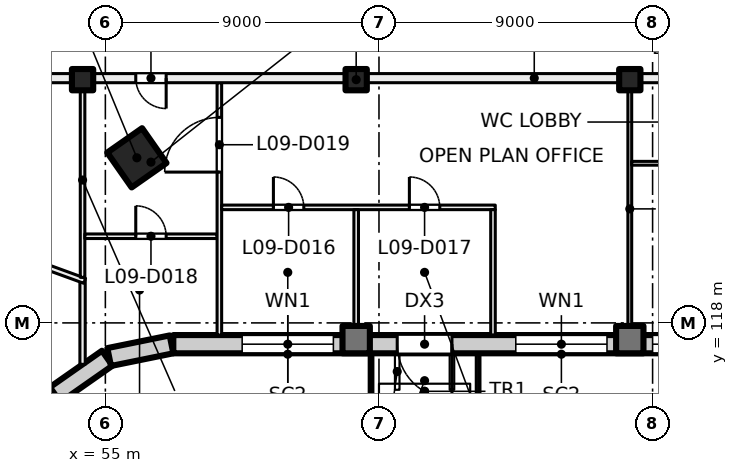
"""IFC4 building model, lengths in metres.
Left out: names, types, materials, properties, quantities, classifications, styles, units other than length and angle.
Written with IfcOpenShell. Run it as: python <this file> out.ifc"""

import sys

from ifc_helpers import new_model, si_unit, direction, frame, frame_2d, origin, origin_2d, place, context, subcontext, project, spatial, rectangle, hollow_rectangle, extrude, element, fill, save


model = new_model("IFC4")
c1 = context("Model", 3, precision=1e-05, world=origin(), true_north=direction((0.0, 1.0)))
c2 = subcontext(c1, "Body", "Model", "MODEL_VIEW")
j1 = project(units=[si_unit("LENGTHUNIT", "METRE"), si_unit("PLANEANGLEUNIT", "RADIAN")], contexts=[c1])
p1 = place(None, origin())
s1 = spatial("IfcSite", under=j1, at=p1, CompositionType="ELEMENT")
p2 = place(p1, origin())
s2 = spatial("IfcBuilding", under=s1, at=p2, CompositionType="ELEMENT")
p3 = place(p2, frame((0.0, 0.0, 43.5)))
s3 = spatial("IfcBuildingStorey", under=s2, at=p3, CompositionType="ELEMENT", Elevation=43.5)
p4 = place(p3, frame((56.036, 123.43, 0.0), z_axis=(0.0, 0.0, 1.0), x_axis=(0.573576436351, -0.819152044289, 0.0)))
e1 = element("IfcColumn", 1, at=p4, inside=s3, PredefinedType="COLUMN", context=c2, shape_type="SweptSolid", body=[
    extrude(hollow_rectangle(XDim=1.4, YDim=1.4, WallThickness=0.04, at=origin_2d()), origin(), (0.0, 0.0, 1.0), 4.0),
])
for number, where, z_axis, x_axis in (
    (2, (54.25, 126.0, 0.0), (0.0, 0.0, 1.0), (1.0, 0.0, 0.0)),
    (3, (63.25, 126.0, 0.0), (0.0, 0.0, 1.0), (1.0, 0.0, 0.0)),
    (4, (72.25, 126.0, 0.0), (0.0, 0.0, 1.0), (1.0, 0.0, 0.0)),
):
    element("IfcColumn", number, at=place(p3, frame(where, z_axis=z_axis, x_axis=x_axis)), inside=s3, PredefinedType="COLUMN", context=c2, shape_type="SweptSolid", body=[
        extrude(rectangle(XDim=0.7, YDim=0.7, at=origin_2d()), origin(), (0.0, 0.0, 1.0), 4.0),
    ])
for number, where, z_axis, x_axis in (
    (5, (63.25, 117.45, 0.0), (0.0, 0.0, 1.0), (1.0, 0.0, 0.0)),
    (6, (72.25, 117.45, 0.0), (0.0, 0.0, 1.0), (1.0, 0.0, 0.0)),
):
    element("IfcColumn", number, at=place(p3, frame(where, z_axis=z_axis, x_axis=x_axis)), inside=s3, PredefinedType="COLUMN", context=c2, shape_type="SweptSolid", body=[
        extrude(rectangle(XDim=0.9, YDim=0.9, at=origin_2d()), origin(), (0.0, 0.0, 1.0), 4.0),
    ])
p5 = place(p3, frame((53.305, 115.578, 0.0), z_axis=(0.0, 0.0, 1.0), x_axis=(-0.522402266438, -0.852699168535, 0.0)))
e7 = element("IfcWall", 7, at=p5, inside=s3, PredefinedType="SOLIDWALL", context=c2, shape_type="SweptSolid", body=[
    extrude(rectangle(XDim=2.042, YDim=0.6, at=frame_2d((1.021, 0.0))), origin(), (0.0, 0.0, 1.0), 3.625),
])
for number, where, z_axis, x_axis in (
    (8, (55.062, 116.839, 0.0), (0.0, 0.0, 1.0), (-0.819, -0.574, 0.0)),
    (9, (57.175, 117.294, 0.0), (0.0, 0.0, 1.0), (-0.98, -0.199, 0.0)),
):
    element("IfcWall", number, at=place(p3, frame(where, z_axis=z_axis, x_axis=x_axis)), inside=s3, PredefinedType="SOLIDWALL", context=c2, shape_type="SweptSolid", body=[
        extrude(rectangle(XDim=2.092, YDim=0.6, at=frame_2d((1.046, 0.0))), origin(), (0.0, 0.0, 1.0), 3.625),
    ])
p6 = place(p3, frame((90.98, 117.3, 0.0), z_axis=(0.0, 0.0, 1.0), x_axis=(-1.0, 0.0, 0.0)))
e10 = element("IfcWall", 10, at=p6, inside=s3, PredefinedType="SOLIDWALL", context=c2, shape_type="SweptSolid", body=[
    extrude(rectangle(XDim=33.745, YDim=0.6, at=frame_2d((16.873, 0.0))), origin(), (0.0, 0.0, 1.0), 3.625),
])
p7 = place(p6, frame((1.48, 0.0, 0.9)))
e11 = element("IfcOpeningElement", 11, at=p7, cuts=e10, PredefinedType="OPENING", context=c2, shape_type="SweptSolid", body=[
    extrude(rectangle(XDim=3.0, YDim=2.4, at=frame_2d((1.5, 1.2))), frame((0.0, 0.31, 0.0), z_axis=(0.0, -1.0, 0.0), x_axis=(1.0, 0.0, 0.0)), (0.0, 0.0, 1.0), 0.62),
])
p8 = place(p6, frame((5.98, 0.0, 0.9)))
e12 = element("IfcOpeningElement", 12, at=p8, cuts=e10, PredefinedType="OPENING", context=c2, shape_type="SweptSolid", body=[
    extrude(rectangle(XDim=3.0, YDim=2.4, at=frame_2d((1.5, 1.2))), frame((0.0, 0.31, 0.0), z_axis=(0.0, -1.0, 0.0), x_axis=(1.0, 0.0, 0.0)), (0.0, 0.0, 1.0), 0.62),
])
p9 = place(p6, frame((10.48, 0.0, 0.9)))
e13 = element("IfcOpeningElement", 13, at=p9, cuts=e10, PredefinedType="OPENING", context=c2, shape_type="SweptSolid", body=[
    extrude(rectangle(XDim=3.0, YDim=2.4, at=frame_2d((1.5, 1.2))), frame((0.0, 0.31, 0.0), z_axis=(0.0, -1.0, 0.0), x_axis=(1.0, 0.0, 0.0)), (0.0, 0.0, 1.0), 0.62),
])
p10 = place(p6, frame((14.98, 0.0, 0.9)))
e14 = element("IfcOpeningElement", 14, at=p10, cuts=e10, PredefinedType="OPENING", context=c2, shape_type="SweptSolid", body=[
    extrude(rectangle(XDim=3.0, YDim=2.4, at=frame_2d((1.5, 1.2))), frame((0.0, 0.31, 0.0), z_axis=(0.0, -1.0, 0.0), x_axis=(1.0, 0.0, 0.0)), (0.0, 0.0, 1.0), 0.62),
])
p11 = place(p6, frame((19.48, 0.0, 0.9)))
e15 = element("IfcOpeningElement", 15, at=p11, cuts=e10, PredefinedType="OPENING", context=c2, shape_type="SweptSolid", body=[
    extrude(rectangle(XDim=3.0, YDim=2.4, at=frame_2d((1.5, 1.2))), frame((0.0, 0.31, 0.0), z_axis=(0.0, -1.0, 0.0), x_axis=(1.0, 0.0, 0.0)), (0.0, 0.0, 1.0), 0.62),
])
p12 = place(p6, frame((24.58, 0.0, 0.0)))
e16 = element("IfcOpeningElement", 16, at=p12, cuts=e10, PredefinedType="OPENING", context=c2, shape_type="SweptSolid", body=[
    extrude(rectangle(XDim=1.8, YDim=2.4, at=frame_2d((0.9, 1.2))), frame((0.0, 0.31, 0.0), z_axis=(0.0, -1.0, 0.0), x_axis=(1.0, 0.0, 0.0)), (0.0, 0.0, 1.0), 0.62),
])
p13 = place(p6, frame((28.48, 0.0, 0.9)))
e17 = element("IfcOpeningElement", 17, at=p13, cuts=e10, PredefinedType="OPENING", context=c2, shape_type="SweptSolid", body=[
    extrude(rectangle(XDim=3.0, YDim=2.4, at=frame_2d((1.5, 1.2))), frame((0.0, 0.31, 0.0), z_axis=(0.0, -1.0, 0.0), x_axis=(1.0, 0.0, 0.0)), (0.0, 0.0, 1.0), 0.62),
])
p14 = place(p3, frame((54.25, 116.637, 0.0), z_axis=(0.0, 0.0, 1.0), x_axis=(0.0, 1.0, 0.0)))
e18 = element("IfcWall", 18, at=p14, inside=s3, PredefinedType="PARTITIONING", context=c2, shape_type="SweptSolid", body=[
    extrude(rectangle(XDim=2.776, YDim=0.175, at=frame_2d((1.388, 0.0))), origin(), (0.0, 0.0, 1.0), 3.625),
])
p15 = place(p3, frame((54.32, 119.384, 0.0), z_axis=(0.0, 0.0, 1.0), x_axis=(-0.939632908118, 0.342184157994, 0.0)))
e19 = element("IfcWall", 19, at=p15, inside=s3, PredefinedType="PARTITIONING", context=c2, shape_type="SweptSolid", body=[
    extrude(rectangle(XDim=8.665, YDim=0.175, at=frame_2d((4.333, 0.0))), origin(), (0.0, 0.0, 1.0), 3.625),
])
p16 = place(p3, frame((54.25, 119.498, 0.0), z_axis=(0.0, 0.0, 1.0), x_axis=(0.0, 1.0, 0.0)))
e20 = element("IfcWall", 20, at=p16, inside=s3, PredefinedType="PARTITIONING", context=c2, shape_type="SweptSolid", body=[
    extrude(rectangle(XDim=6.402, YDim=0.15, at=frame_2d((3.201, 0.0))), origin(), (0.0, 0.0, 1.0), 3.625),
])
p17 = place(p3, frame((54.325, 120.85, 0.0), z_axis=(0.0, 0.0, 1.0), x_axis=(1.0, 0.0, 0.0)))
e21 = element("IfcWall", 21, at=p17, inside=s3, PredefinedType="PARTITIONING", context=c2, shape_type="SweptSolid", body=[
    extrude(rectangle(XDim=4.35, YDim=0.15, at=frame_2d((2.175, 0.0))), origin(), (0.0, 0.0, 1.0), 3.625),
])
p18 = place(p17, frame((1.675, 0.0, 0.0)))
e22 = element("IfcOpeningElement", 22, at=p18, cuts=e21, PredefinedType="OPENING", context=c2, shape_type="SweptSolid", body=[
    extrude(rectangle(XDim=1.0, YDim=2.1, at=frame_2d((0.5, 1.05))), frame((0.0, 0.085, 0.0), z_axis=(0.0, -1.0, 0.0), x_axis=(1.0, 0.0, 0.0)), (0.0, 0.0, 1.0), 0.17),
])
p19 = place(p3, frame((58.75, 117.6, 0.0), z_axis=(0.0, 0.0, 1.0), x_axis=(0.0, 1.0, 0.0)))
e23 = element("IfcWall", 23, at=p19, inside=s3, PredefinedType="PARTITIONING", context=c2, shape_type="SweptSolid", body=[
    extrude(rectangle(XDim=8.3, YDim=0.15, at=frame_2d((4.15, 0.0))), origin(), (0.0, 0.0, 1.0), 3.625),
])
p20 = place(p19, frame((5.36, 0.0, 0.0)))
e24 = element("IfcOpeningElement", 24, at=p20, cuts=e23, PredefinedType="OPENING", context=c2, shape_type="SweptSolid", body=[
    extrude(rectangle(XDim=1.8, YDim=2.1, at=frame_2d((0.9, 1.05))), frame((0.0, 0.085, 0.0), z_axis=(0.0, -1.0, 0.0), x_axis=(1.0, 0.0, 0.0)), (0.0, 0.0, 1.0), 0.17),
])
p21 = place(p3, frame((58.825, 121.8, 0.0), z_axis=(0.0, 0.0, 1.0), x_axis=(1.0, 0.0, 0.0)))
e25 = element("IfcWall", 25, at=p21, inside=s3, PredefinedType="PARTITIONING", context=c2, shape_type="SweptSolid", body=[
    extrude(rectangle(XDim=9.0, YDim=0.15, at=frame_2d((4.5, 0.0))), origin(), (0.0, 0.0, 1.0), 3.625),
])
p22 = place(p21, frame((1.702, 0.0, 0.0)))
e26 = element("IfcOpeningElement", 26, at=p22, cuts=e25, PredefinedType="OPENING", context=c2, shape_type="SweptSolid", body=[
    extrude(rectangle(XDim=1.0, YDim=2.1, at=frame_2d((0.5, 1.05))), frame((0.0, 0.085, 0.0), z_axis=(0.0, -1.0, 0.0), x_axis=(1.0, 0.0, 0.0)), (0.0, 0.0, 1.0), 0.17),
])
p23 = place(p21, frame((6.175, 0.0, 0.0)))
e27 = element("IfcOpeningElement", 27, at=p23, cuts=e25, PredefinedType="OPENING", context=c2, shape_type="SweptSolid", body=[
    extrude(rectangle(XDim=1.0, YDim=2.1, at=frame_2d((0.5, 1.05))), frame((0.0, 0.085, 0.0), z_axis=(0.0, -1.0, 0.0), x_axis=(1.0, 0.0, 0.0)), (0.0, 0.0, 1.0), 0.17),
])
for number, where, z_axis, x_axis in (
    (28, (63.25, 121.725, 0.0), (0.0, 0.0, 1.0), (0.0, -1.0, 0.0)),
    (29, (67.75, 117.6, 0.0), (0.0, 0.0, 1.0), (0.0, 1.0, 0.0)),
):
    element("IfcWall", number, at=place(p3, frame(where, z_axis=z_axis, x_axis=x_axis)), inside=s3, PredefinedType="PARTITIONING", context=c2, shape_type="SweptSolid", body=[
        extrude(rectangle(XDim=4.125, YDim=0.15, at=frame_2d((2.062, 0.0))), origin(), (0.0, 0.0, 1.0), 3.625),
    ])
p24 = place(p3, frame((72.25, 117.6, 0.0), z_axis=(0.0, 0.0, 1.0), x_axis=(0.0, 1.0, 0.0)))
e30 = element("IfcWall", 30, at=p24, inside=s3, PredefinedType="PARTITIONING", context=c2, shape_type="SweptSolid", body=[
    extrude(rectangle(XDim=8.3, YDim=0.125, at=frame_2d((4.15, 0.0))), origin(), (0.0, 0.0, 1.0), 3.625),
])
p25 = place(p3, frame((81.188, 123.25, 0.0), z_axis=(0.0, 0.0, 1.0), x_axis=(-1.0, 0.0, 0.0)))
e31 = element("IfcWall", 31, at=p25, inside=s3, PredefinedType="PARTITIONING", context=c2, shape_type="SweptSolid", body=[
    extrude(rectangle(XDim=8.876, YDim=0.125, at=frame_2d((4.438, 0.0))), origin(), (0.0, 0.0, 1.0), 3.625),
])
p26 = place(p25, frame((6.267, 0.0, 0.0)))
e32 = element("IfcOpeningElement", 32, at=p26, cuts=e31, PredefinedType="OPENING", context=c2, shape_type="SweptSolid", body=[
    extrude(rectangle(XDim=0.8, YDim=2.1, at=frame_2d((0.4, 1.05))), frame((0.0, 0.073, 0.0), z_axis=(0.0, -1.0, 0.0), x_axis=(1.0, 0.0, 0.0)), (0.0, 0.0, 1.0), 0.145),
])
p27 = place(p25, frame((3.037, 0.0, 0.0)))
e33 = element("IfcOpeningElement", 33, at=p27, cuts=e31, PredefinedType="OPENING", context=c2, shape_type="SweptSolid", body=[
    extrude(rectangle(XDim=0.8, YDim=2.1, at=frame_2d((0.4, 1.05))), frame((0.0, 0.073, 0.0), z_axis=(0.0, -1.0, 0.0), x_axis=(1.0, 0.0, 0.0)), (0.0, 0.0, 1.0), 0.145),
])
p28 = place(p3, frame((91.0, 126.05, 0.0), z_axis=(0.0, 0.0, 1.0), x_axis=(-1.0, 0.0, 0.0)))
e34 = element("IfcWall", 34, at=p28, inside=s3, PredefinedType="PARTITIONING", context=c2, shape_type="SweptSolid", body=[
    extrude(rectangle(XDim=43.785, YDim=0.3, at=frame_2d((21.893, 0.0))), origin(), (0.0, 0.0, 1.0), 3.625),
])
p29 = place(p28, frame((4.375, 0.0, 0.0)))
e35 = element("IfcOpeningElement", 35, at=p29, cuts=e34, PredefinedType="OPENING", context=c2, shape_type="SweptSolid", body=[
    extrude(rectangle(XDim=1.0, YDim=2.1, at=frame_2d((0.5, 1.05))), frame((0.0, 0.16, 0.0), z_axis=(0.0, -1.0, 0.0), x_axis=(1.0, 0.0, 0.0)), (0.0, 0.0, 1.0), 0.32),
])
p30 = place(p28, frame((15.0, 0.0, 0.0)))
e36 = element("IfcOpeningElement", 36, at=p30, cuts=e34, PredefinedType="OPENING", context=c2, shape_type="SweptSolid", body=[
    extrude(rectangle(XDim=1.0, YDim=2.1, at=frame_2d((0.5, 1.05))), frame((0.0, 0.16, 0.0), z_axis=(0.0, -1.0, 0.0), x_axis=(1.0, 0.0, 0.0)), (0.0, 0.0, 1.0), 0.32),
])
p31 = place(p28, frame((34.0, 0.0, 0.0)))
e37 = element("IfcOpeningElement", 37, at=p31, cuts=e34, PredefinedType="OPENING", context=c2, shape_type="SweptSolid", body=[
    extrude(rectangle(XDim=1.0, YDim=2.1, at=frame_2d((0.5, 1.05))), frame((0.0, 0.16, 0.0), z_axis=(0.0, -1.0, 0.0), x_axis=(1.0, 0.0, 0.0)), (0.0, 0.0, 1.0), 0.32),
])
p32 = place(p28, frame((39.296, 0.0, 0.0)))
e38 = element("IfcOpeningElement", 38, at=p32, cuts=e34, PredefinedType="OPENING", context=c2, shape_type="SweptSolid", body=[
    extrude(rectangle(XDim=1.8, YDim=2.1, at=frame_2d((0.9, 1.05))), frame((0.0, 0.16, 0.0), z_axis=(0.0, -1.0, 0.0), x_axis=(1.0, 0.0, 0.0)), (0.0, 0.0, 1.0), 0.32),
])
p33 = place(p10, origin())
e39 = element("IfcWindow", 39, at=p33, inside=s3, PartitioningType="SINGLE_PANEL", PredefinedType="WINDOW", context=c2, shape_type="SweptSolid", body=[
    extrude(rectangle(XDim=3.0, YDim=2.4, at=frame_2d((1.5, 1.2))), frame((0.0, 0.03, 0.0), z_axis=(0.0, -1.0, 0.0), x_axis=(1.0, 0.0, 0.0)), (0.0, 0.0, 1.0), 0.06),
])
fill(e14, e39)
p34 = place(p11, origin())
e40 = element("IfcWindow", 40, at=p34, inside=s3, PartitioningType="SINGLE_PANEL", PredefinedType="WINDOW", context=c2, shape_type="SweptSolid", body=[
    extrude(rectangle(XDim=3.0, YDim=2.4, at=frame_2d((1.5, 1.2))), frame((0.0, 0.03, 0.0), z_axis=(0.0, -1.0, 0.0), x_axis=(1.0, 0.0, 0.0)), (0.0, 0.0, 1.0), 0.06),
])
fill(e15, e40)
p35 = place(p12, origin())
e41 = element("IfcDoor", 41, at=p35, inside=s3, OperationType="DOUBLE_DOOR_SINGLE_SWING", PredefinedType="DOOR", context=c2, shape_type="SweptSolid", body=[
    extrude(rectangle(XDim=1.8, YDim=2.4, at=frame_2d((0.9, 1.2))), frame((0.0, 0.025, 0.0), z_axis=(0.0, -1.0, 0.0), x_axis=(1.0, 0.0, 0.0)), (0.0, 0.0, 1.0), 0.05),
])
fill(e16, e41)
p36 = place(p13, origin())
e42 = element("IfcWindow", 42, at=p36, inside=s3, PartitioningType="SINGLE_PANEL", PredefinedType="WINDOW", context=c2, shape_type="SweptSolid", body=[
    extrude(rectangle(XDim=3.0, YDim=2.4, at=frame_2d((1.5, 1.2))), frame((0.0, 0.03, 0.0), z_axis=(0.0, -1.0, 0.0), x_axis=(1.0, 0.0, 0.0)), (0.0, 0.0, 1.0), 0.06),
])
fill(e17, e42)
p37 = place(p31, origin())
e43 = element("IfcDoor", 43, at=p37, inside=s3, OperationType="SINGLE_SWING_LEFT", PredefinedType="DOOR", context=c2, shape_type="SweptSolid", body=[
    extrude(rectangle(XDim=1.0, YDim=2.1, at=frame_2d((0.5, 1.05))), frame((0.0, 0.025, 0.0), z_axis=(0.0, -1.0, 0.0), x_axis=(1.0, 0.0, 0.0)), (0.0, 0.0, 1.0), 0.05),
])
fill(e37, e43)
p38 = place(p22, origin())
e44 = element("IfcDoor", 44, at=p38, inside=s3, OperationType="SINGLE_SWING_LEFT", PredefinedType="DOOR", context=c2, shape_type="SweptSolid", body=[
    extrude(rectangle(XDim=1.0, YDim=2.1, at=frame_2d((0.5, 1.05))), frame((0.0, 0.025, 0.0), z_axis=(0.0, -1.0, 0.0), x_axis=(1.0, 0.0, 0.0)), (0.0, 0.0, 1.0), 0.05),
])
fill(e26, e44)
p39 = place(p23, origin())
e45 = element("IfcDoor", 45, at=p39, inside=s3, OperationType="SINGLE_SWING_RIGHT", PredefinedType="DOOR", context=c2, shape_type="SweptSolid", body=[
    extrude(rectangle(XDim=1.0, YDim=2.1, at=frame_2d((0.5, 1.05))), frame((0.0, 0.025, 0.0), z_axis=(0.0, -1.0, 0.0), x_axis=(1.0, 0.0, 0.0)), (0.0, 0.0, 1.0), 0.05),
])
fill(e27, e45)
p40 = place(p18, origin())
e46 = element("IfcDoor", 46, at=p40, inside=s3, OperationType="SINGLE_SWING_LEFT", PredefinedType="DOOR", context=c2, shape_type="SweptSolid", body=[
    extrude(rectangle(XDim=1.0, YDim=2.1, at=frame_2d((0.5, 1.05))), frame((0.0, 0.025, 0.0), z_axis=(0.0, -1.0, 0.0), x_axis=(1.0, 0.0, 0.0)), (0.0, 0.0, 1.0), 0.05),
])
fill(e22, e46)
p41 = place(p20, origin())
e47 = element("IfcDoor", 47, at=p41, inside=s3, OperationType="DOUBLE_DOOR_SINGLE_SWING", PredefinedType="DOOR", context=c2, shape_type="SweptSolid", body=[
    extrude(rectangle(XDim=1.8, YDim=2.1, at=frame_2d((0.9, 1.05))), frame((0.0, 0.025, 0.0), z_axis=(0.0, -1.0, 0.0), x_axis=(1.0, 0.0, 0.0)), (0.0, 0.0, 1.0), 0.05),
])
fill(e24, e47)
save(model, sys.argv[1])
